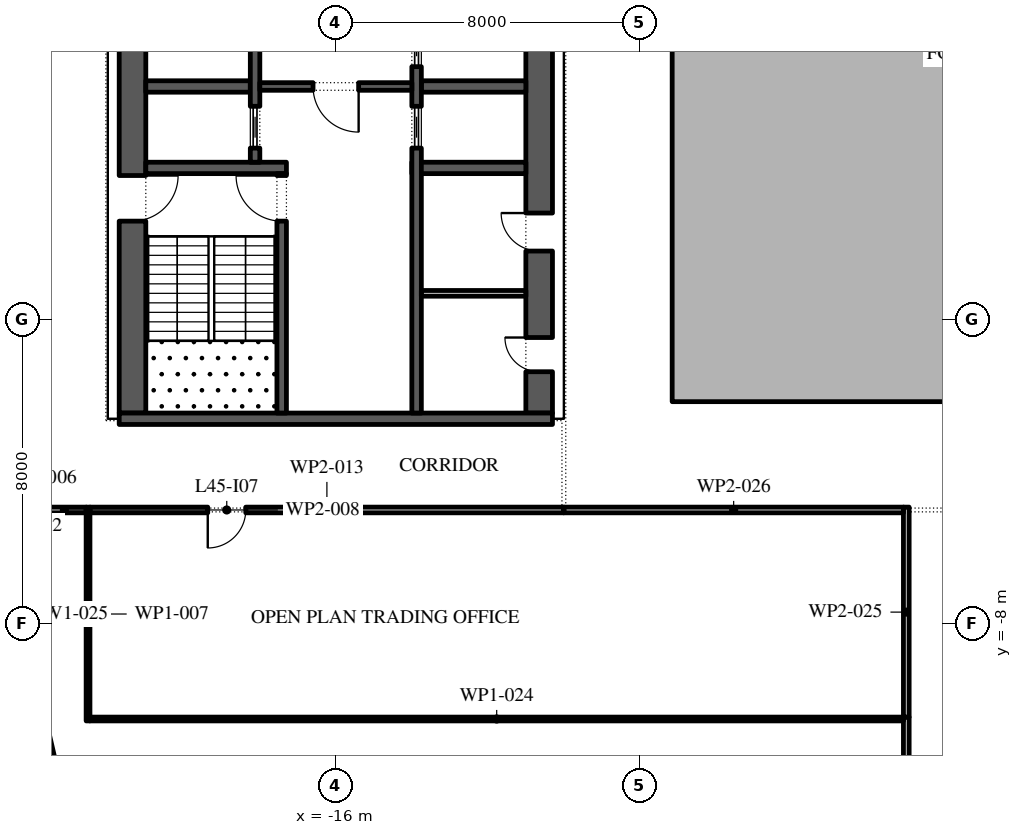
"""IFC4 building model, lengths in metres.
Left out: names, types, materials, properties, quantities, classifications, styles, units other than length and angle.
Written with IfcOpenShell. Run it as: python <this file> out.ifc"""

import sys

from ifc_helpers import new_model, si_unit, direction, frame, frame_2d, origin, place, context, subcontext, project, spatial, polyline, rectangle, outline, extrude, element, fill, save


model = new_model("IFC4")
c1 = context("Model", 3, precision=1e-05, world=origin(), true_north=direction((0.0, 1.0)))
c2 = subcontext(c1, "Body", "Model", "MODEL_VIEW")
j1 = project(units=[si_unit("LENGTHUNIT", "METRE"), si_unit("PLANEANGLEUNIT", "RADIAN")], contexts=[c1])
p1 = place(None, origin())
s1 = spatial("IfcSite", under=j1, at=p1, CompositionType="ELEMENT")
p2 = place(p1, origin())
s2 = spatial("IfcBuilding", under=s1, at=p2, CompositionType="ELEMENT")
p3 = place(p2, frame((0.0, 0.0, 205.2)))
s3 = spatial("IfcBuildingStorey", under=s2, at=p3, CompositionType="ELEMENT", Elevation=205.2)
p4 = place(p3, origin())
e1 = element("IfcWall", 1, at=p4, inside=s3, PredefinedType="STANDARD", context=c2, shape_type="SweptSolid", body=[
    extrude(outline(polyline([(-7.15, -2.15), (7.15, -2.15), (7.15, 16.15), (-7.15, 16.15), (-7.15, -2.15)]), holes=[polyline([(-7.0, -2.0), (-7.0, 16.0), (7.0, 16.0), (7.0, -2.0), (-7.0, -2.0)])]), origin(), (0.0, 0.0, 1.0), 4.0),
])
p5 = place(p3, frame((-17.592, -20.657, 0.0), z_axis=(0.0, 0.0, 1.0), x_axis=(0.974370243697, 0.224950279389, 0.0)))
e2 = element("IfcWall", 2, at=p5, inside=s3, PredefinedType="STANDARD", context=c2, shape_type="SweptSolid", body=[
    extrude(rectangle(XDim=49.5, YDim=0.3, at=frame_2d((24.75, 0.0))), origin(), (0.0, 0.0, 1.0), 4.0),
])
p6 = place(p5, frame((2.8, 0.0, 0.0)))
e3 = element("IfcOpeningElement", 3, at=p6, cuts=e2, PredefinedType="OPENING", context=c2, shape_type="SweptSolid", body=[
    extrude(rectangle(XDim=2.4, YDim=3.5, at=frame_2d((1.2, 1.75))), frame((0.0, 0.16, 0.0), z_axis=(0.0, -1.0, 0.0), x_axis=(1.0, 0.0, 0.0)), (0.0, 0.0, 1.0), 0.32),
])
p7 = place(p5, frame((9.9, 0.0, 0.45)))
e4 = element("IfcOpeningElement", 4, at=p7, cuts=e2, PredefinedType="OPENING", context=c2, shape_type="SweptSolid", body=[
    extrude(rectangle(XDim=4.5, YDim=2.575, at=frame_2d((2.25, 1.288))), frame((0.0, 0.16, 0.0), z_axis=(0.0, -1.0, 0.0), x_axis=(1.0, 0.0, 0.0)), (0.0, 0.0, 1.0), 0.32),
])
p8 = place(p5, frame((18.2, 0.0, 0.45)))
e5 = element("IfcOpeningElement", 5, at=p8, cuts=e2, PredefinedType="OPENING", context=c2, shape_type="SweptSolid", body=[
    extrude(rectangle(XDim=4.5, YDim=3.05, at=frame_2d((2.25, 1.525))), frame((0.0, 0.16, 0.0), z_axis=(0.0, -1.0, 0.0), x_axis=(1.0, 0.0, 0.0)), (0.0, 0.0, 1.0), 0.32),
])
p9 = place(p5, frame((26.5, 0.0, 0.45)))
e6 = element("IfcOpeningElement", 6, at=p9, cuts=e2, PredefinedType="OPENING", context=c2, shape_type="SweptSolid", body=[
    extrude(rectangle(XDim=4.5, YDim=2.75, at=frame_2d((2.25, 1.375))), frame((0.0, 0.16, 0.0), z_axis=(0.0, -1.0, 0.0), x_axis=(1.0, 0.0, 0.0)), (0.0, 0.0, 1.0), 0.32),
])
p10 = place(p5, frame((36.8, 0.0, 0.0)))
e7 = element("IfcOpeningElement", 7, at=p10, cuts=e2, PredefinedType="OPENING", context=c2, shape_type="SweptSolid", body=[
    extrude(rectangle(XDim=2.4, YDim=3.275, at=frame_2d((1.2, 1.637))), frame((0.0, 0.16, 0.0), z_axis=(0.0, -1.0, 0.0), x_axis=(1.0, 0.0, 0.0)), (0.0, 0.0, 1.0), 0.32),
])
p11 = place(p5, frame((43.1, 0.0, 0.45)))
e8 = element("IfcOpeningElement", 8, at=p11, cuts=e2, PredefinedType="OPENING", context=c2, shape_type="SweptSolid", body=[
    extrude(rectangle(XDim=4.5, YDim=2.875, at=frame_2d((2.25, 1.438))), frame((0.0, 0.16, 0.0), z_axis=(0.0, -1.0, 0.0), x_axis=(1.0, 0.0, 0.0)), (0.0, 0.0, 1.0), 0.32),
])
p12 = place(p3, frame((-33.157, 30.092, 0.0), z_axis=(0.0, 0.0, 1.0), x_axis=(0.224950279389, -0.974370243697, 0.0)))
e9 = element("IfcWall", 9, at=p12, inside=s3, PredefinedType="STANDARD", context=c2, shape_type="SweptSolid", body=[
    extrude(rectangle(XDim=49.5, YDim=0.3, at=frame_2d((24.75, 0.0))), origin(), (0.0, 0.0, 1.0), 4.0),
])
p13 = place(p12, frame((2.207, 0.0, 0.0)))
e10 = element("IfcOpeningElement", 10, at=p13, cuts=e9, PredefinedType="OPENING", context=c2, shape_type="SweptSolid", body=[
    extrude(rectangle(XDim=2.4, YDim=3.5, at=frame_2d((1.2, 1.75))), frame((0.0, 0.16, 0.0), z_axis=(0.0, -1.0, 0.0), x_axis=(1.0, 0.0, 0.0)), (0.0, 0.0, 1.0), 0.32),
])
p14 = place(p12, frame((8.121, 0.0, 0.45)))
e11 = element("IfcOpeningElement", 11, at=p14, cuts=e9, PredefinedType="OPENING", context=c2, shape_type="SweptSolid", body=[
    extrude(rectangle(XDim=4.5, YDim=2.825, at=frame_2d((2.25, 1.413))), frame((0.0, 0.16, 0.0), z_axis=(0.0, -1.0, 0.0), x_axis=(1.0, 0.0, 0.0)), (0.0, 0.0, 1.0), 0.32),
])
p15 = place(p12, frame((15.236, 0.0, 0.45)))
e12 = element("IfcOpeningElement", 12, at=p15, cuts=e9, PredefinedType="OPENING", context=c2, shape_type="SweptSolid", body=[
    extrude(rectangle(XDim=4.5, YDim=2.95, at=frame_2d((2.25, 1.475))), frame((0.0, 0.16, 0.0), z_axis=(0.0, -1.0, 0.0), x_axis=(1.0, 0.0, 0.0)), (0.0, 0.0, 1.0), 0.32),
])
p16 = place(p12, frame((22.35, 0.0, 0.45)))
e13 = element("IfcOpeningElement", 13, at=p16, cuts=e9, PredefinedType="OPENING", context=c2, shape_type="SweptSolid", body=[
    extrude(rectangle(XDim=4.5, YDim=3.0, at=frame_2d((2.25, 1.5))), frame((0.0, 0.16, 0.0), z_axis=(0.0, -1.0, 0.0), x_axis=(1.0, 0.0, 0.0)), (0.0, 0.0, 1.0), 0.32),
])
p17 = place(p12, frame((30.514, 0.0, 0.0)))
e14 = element("IfcOpeningElement", 14, at=p17, cuts=e9, PredefinedType="OPENING", context=c2, shape_type="SweptSolid", body=[
    extrude(rectangle(XDim=2.4, YDim=3.5, at=frame_2d((1.2, 1.75))), frame((0.0, 0.16, 0.0), z_axis=(0.0, -1.0, 0.0), x_axis=(1.0, 0.0, 0.0)), (0.0, 0.0, 1.0), 0.32),
])
p18 = place(p12, frame((36.579, 0.0, 0.45)))
e15 = element("IfcOpeningElement", 15, at=p18, cuts=e9, PredefinedType="OPENING", context=c2, shape_type="SweptSolid", body=[
    extrude(rectangle(XDim=4.5, YDim=3.05, at=frame_2d((2.25, 1.525))), frame((0.0, 0.16, 0.0), z_axis=(0.0, -1.0, 0.0), x_axis=(1.0, 0.0, 0.0)), (0.0, 0.0, 1.0), 0.32),
])
p19 = place(p12, frame((43.693, 0.0, 0.45)))
e16 = element("IfcOpeningElement", 16, at=p19, cuts=e9, PredefinedType="OPENING", context=c2, shape_type="SweptSolid", body=[
    extrude(rectangle(XDim=4.5, YDim=3.05, at=frame_2d((2.25, 1.525))), frame((0.0, 0.16, 0.0), z_axis=(0.0, -1.0, 0.0), x_axis=(1.0, 0.0, 0.0)), (0.0, 0.0, 1.0), 0.32),
])
p20 = place(p3, frame((-21.35, -2.45, 0.0), z_axis=(0.0, 0.0, 1.0), x_axis=(0.0, 1.0, 0.0)))
e17 = element("IfcWall", 17, at=p20, inside=s3, PredefinedType="SHEAR", context=c2, shape_type="SweptSolid", body=[
    extrude(rectangle(XDim=27.9, YDim=0.7, at=frame_2d((13.95, 0.0))), origin(), (0.0, 0.0, 1.0), 4.0),
])
p21 = place(p20, frame((5.05, 0.0, 0.0)))
e18 = element("IfcOpeningElement", 18, at=p21, cuts=e17, PredefinedType="OPENING", context=c2, shape_type="SweptSolid", body=[
    extrude(rectangle(XDim=1.2, YDim=2.1, at=frame_2d((0.6, 1.05))), frame((0.0, 0.36, 0.0), z_axis=(0.0, -1.0, 0.0), x_axis=(1.0, 0.0, 0.0)), (0.0, 0.0, 1.0), 0.72),
])
p22 = place(p20, frame((21.65, 0.0, 0.0)))
e19 = element("IfcOpeningElement", 19, at=p22, cuts=e17, PredefinedType="OPENING", context=c2, shape_type="SweptSolid", body=[
    extrude(rectangle(XDim=1.2, YDim=2.1, at=frame_2d((0.6, 1.05))), frame((0.0, 0.36, 0.0), z_axis=(0.0, -1.0, 0.0), x_axis=(1.0, 0.0, 0.0)), (0.0, 0.0, 1.0), 0.72),
])
p23 = place(p3, frame((-10.65, -2.45, 0.0), z_axis=(0.0, 0.0, 1.0), x_axis=(0.0, 1.0, 0.0)))
e20 = element("IfcWall", 20, at=p23, inside=s3, PredefinedType="SHEAR", context=c2, shape_type="SweptSolid", body=[
    extrude(rectangle(XDim=27.9, YDim=0.7, at=frame_2d((13.95, 0.0))), origin(), (0.0, 0.0, 1.0), 4.0),
])
p24 = place(p23, frame((23.65, 0.0, 0.0)))
e21 = element("IfcOpeningElement", 21, at=p24, cuts=e20, PredefinedType="OPENING", context=c2, shape_type="SweptSolid", body=[
    extrude(rectangle(XDim=2.4, YDim=2.1, at=frame_2d((1.2, 1.05))), frame((0.0, 0.36, 0.0), z_axis=(0.0, -1.0, 0.0), x_axis=(1.0, 0.0, 0.0)), (0.0, 0.0, 1.0), 0.72),
])
p25 = place(p23, frame((1.087, 0.0, 0.0)))
e22 = element("IfcOpeningElement", 22, at=p25, cuts=e20, PredefinedType="OPENING", context=c2, shape_type="SweptSolid", body=[
    extrude(rectangle(XDim=0.9, YDim=2.1, at=frame_2d((0.45, 1.05))), frame((0.0, 0.36, 0.0), z_axis=(0.0, -1.0, 0.0), x_axis=(1.0, 0.0, 0.0)), (0.0, 0.0, 1.0), 0.72),
])
p26 = place(p23, frame((4.262, 0.0, 0.0)))
e23 = element("IfcOpeningElement", 23, at=p26, cuts=e20, PredefinedType="OPENING", context=c2, shape_type="SweptSolid", body=[
    extrude(rectangle(XDim=1.0, YDim=2.1, at=frame_2d((0.5, 1.05))), frame((0.0, 0.36, 0.0), z_axis=(0.0, -1.0, 0.0), x_axis=(1.0, 0.0, 0.0)), (0.0, 0.0, 1.0), 0.72),
])
p27 = place(p3, frame((-21.7, -2.6, 0.0), z_axis=(0.0, 0.0, 1.0), x_axis=(1.0, 0.0, 0.0)))
e24 = element("IfcWall", 24, at=p27, inside=s3, PredefinedType="SHEAR", context=c2, shape_type="SweptSolid", body=[
    extrude(rectangle(XDim=11.4, YDim=0.3, at=frame_2d((5.7, 0.0))), origin(), (0.0, 0.0, 1.0), 4.0),
])
p28 = place(p3, frame((-21.0, 4.0, 0.0), z_axis=(0.0, 0.0, 1.0), x_axis=(1.0, 0.0, 0.0)))
e25 = element("IfcWall", 25, at=p28, inside=s3, PredefinedType="SHEAR", context=c2, shape_type="SweptSolid", body=[
    extrude(rectangle(XDim=3.7, YDim=0.3, at=frame_2d((1.85, 0.0))), origin(), (0.0, 0.0, 1.0), 4.0),
])
p29 = place(p3, frame((-17.425, -2.45, 0.0), z_axis=(0.0, 0.0, 1.0), x_axis=(0.0, 1.0, 0.0)))
e26 = element("IfcWall", 26, at=p29, inside=s3, PredefinedType="SHEAR", context=c2, shape_type="SweptSolid", body=[
    extrude(rectangle(XDim=6.3, YDim=0.25, at=frame_2d((3.15, 0.0))), origin(), (0.0, 0.0, 1.0), 4.0),
])
p30 = place(p29, frame((5.05, 0.0, 0.0)))
e27 = element("IfcOpeningElement", 27, at=p30, cuts=e26, PredefinedType="OPENING", context=c2, shape_type="SweptSolid", body=[
    extrude(rectangle(XDim=1.2, YDim=2.1, at=frame_2d((0.6, 1.05))), frame((0.0, 0.135, 0.0), z_axis=(0.0, -1.0, 0.0), x_axis=(1.0, 0.0, 0.0)), (0.0, 0.0, 1.0), 0.27),
])
p31 = place(p3, frame((-21.0, 6.143, 0.0), z_axis=(0.0, 0.0, 1.0), x_axis=(1.0, 0.0, 0.0)))
e28 = element("IfcWall", 28, at=p31, inside=s3, PredefinedType="SHEAR", context=c2, shape_type="SweptSolid", body=[
    extrude(rectangle(XDim=2.75, YDim=0.3, at=frame_2d((1.375, 0.0))), origin(), (0.0, 0.0, 1.0), 4.0),
])
p32 = place(p3, frame((-18.125, 4.15, 0.0), z_axis=(0.0, 0.0, 1.0), x_axis=(0.0, 1.0, 0.0)))
e29 = element("IfcWall", 29, at=p32, inside=s3, PredefinedType="SHEAR", context=c2, shape_type="SweptSolid", body=[
    extrude(rectangle(XDim=14.7, YDim=0.25, at=frame_2d((7.35, 0.0))), origin(), (0.0, 0.0, 1.0), 4.0),
])
p33 = place(p32, frame((6.9, 0.0, 0.0)))
e30 = element("IfcOpeningElement", 30, at=p33, cuts=e29, PredefinedType="OPENING", context=c2, shape_type="SweptSolid", body=[
    extrude(rectangle(XDim=0.9, YDim=2.1, at=frame_2d((0.45, 1.05))), frame((0.0, 0.135, 0.0), z_axis=(0.0, -1.0, 0.0), x_axis=(1.0, 0.0, 0.0)), (0.0, 0.0, 1.0), 0.27),
])
p34 = place(p32, frame((0.371, 0.0, 0.0)))
e31 = element("IfcOpeningElement", 31, at=p34, cuts=e29, PredefinedType="OPENING", context=c2, shape_type="SweptSolid", body=[
    extrude(rectangle(XDim=1.1, YDim=2.1, at=frame_2d((0.55, 1.05))), frame((0.0, 0.135, 0.0), z_axis=(0.0, -1.0, 0.0), x_axis=(1.0, 0.0, 0.0)), (0.0, 0.0, 1.0), 0.27),
])
p35 = place(p32, frame((13.229, 0.0, 0.0)))
e32 = element("IfcOpeningElement", 32, at=p35, cuts=e29, PredefinedType="OPENING", context=c2, shape_type="SweptSolid", body=[
    extrude(rectangle(XDim=1.1, YDim=2.1, at=frame_2d((0.55, 1.05))), frame((0.0, 0.135, 0.0), z_axis=(0.0, -1.0, 0.0), x_axis=(1.0, 0.0, 0.0)), (0.0, 0.0, 1.0), 0.27),
])
p36 = place(p3, frame((-14.0, 4.0, 0.0), z_axis=(0.0, 0.0, 1.0), x_axis=(1.0, 0.0, 0.0)))
e33 = element("IfcWall", 33, at=p36, inside=s3, PredefinedType="SHEAR", context=c2, shape_type="SweptSolid", body=[
    extrude(rectangle(XDim=3.0, YDim=0.3, at=frame_2d((1.5, 0.0))), origin(), (0.0, 0.0, 1.0), 4.0),
])
p37 = place(p3, frame((-13.75, 6.143, 0.0), z_axis=(0.0, 0.0, 1.0), x_axis=(1.0, 0.0, 0.0)))
e34 = element("IfcWall", 34, at=p37, inside=s3, PredefinedType="SHEAR", context=c2, shape_type="SweptSolid", body=[
    extrude(rectangle(XDim=2.75, YDim=0.3, at=frame_2d((1.375, 0.0))), origin(), (0.0, 0.0, 1.0), 4.0),
])
p38 = place(p3, frame((-13.875, -2.45, 0.0), z_axis=(0.0, 0.0, 1.0), x_axis=(0.0, 1.0, 0.0)))
e35 = element("IfcWall", 35, at=p38, inside=s3, PredefinedType="SHEAR", context=c2, shape_type="SweptSolid", body=[
    extrude(rectangle(XDim=21.3, YDim=0.25, at=frame_2d((10.65, 0.0))), origin(), (0.0, 0.0, 1.0), 4.0),
])
p39 = place(p38, frame((17.786, 0.0, 0.0)))
e36 = element("IfcOpeningElement", 36, at=p39, cuts=e35, PredefinedType="OPENING", context=c2, shape_type="SweptSolid", body=[
    extrude(rectangle(XDim=0.9, YDim=2.1, at=frame_2d((0.45, 1.05))), frame((0.0, 0.135, 0.0), z_axis=(0.0, -1.0, 0.0), x_axis=(1.0, 0.0, 0.0)), (0.0, 0.0, 1.0), 0.27),
])
p40 = place(p38, frame((6.971, 0.0, 0.0)))
e37 = element("IfcOpeningElement", 37, at=p40, cuts=e35, PredefinedType="OPENING", context=c2, shape_type="SweptSolid", body=[
    extrude(rectangle(XDim=1.1, YDim=2.1, at=frame_2d((0.55, 1.05))), frame((0.0, 0.135, 0.0), z_axis=(0.0, -1.0, 0.0), x_axis=(1.0, 0.0, 0.0)), (0.0, 0.0, 1.0), 0.27),
])
p41 = place(p38, frame((9.114, 0.0, 0.0)))
e38 = element("IfcOpeningElement", 38, at=p41, cuts=e35, PredefinedType="OPENING", context=c2, shape_type="SweptSolid", body=[
    extrude(rectangle(XDim=1.1, YDim=2.1, at=frame_2d((0.55, 1.05))), frame((0.0, 0.135, 0.0), z_axis=(0.0, -1.0, 0.0), x_axis=(1.0, 0.0, 0.0)), (0.0, 0.0, 1.0), 0.27),
])
p42 = place(p38, frame((11.257, 0.0, 0.0)))
e39 = element("IfcOpeningElement", 39, at=p42, cuts=e35, PredefinedType="OPENING", context=c2, shape_type="SweptSolid", body=[
    extrude(rectangle(XDim=1.1, YDim=2.1, at=frame_2d((0.55, 1.05))), frame((0.0, 0.135, 0.0), z_axis=(0.0, -1.0, 0.0), x_axis=(1.0, 0.0, 0.0)), (0.0, 0.0, 1.0), 0.27),
])
p43 = place(p38, frame((13.4, 0.0, 0.0)))
e40 = element("IfcOpeningElement", 40, at=p43, cuts=e35, PredefinedType="OPENING", context=c2, shape_type="SweptSolid", body=[
    extrude(rectangle(XDim=1.1, YDim=2.1, at=frame_2d((0.55, 1.05))), frame((0.0, 0.135, 0.0), z_axis=(0.0, -1.0, 0.0), x_axis=(1.0, 0.0, 0.0)), (0.0, 0.0, 1.0), 0.27),
])
p44 = place(p3, frame((-18.0, 6.143, 0.0), z_axis=(0.0, 0.0, 1.0), x_axis=(1.0, 0.0, 0.0)))
e41 = element("IfcWall", 41, at=p44, inside=s3, PredefinedType="SHEAR", context=c2, shape_type="SweptSolid", body=[
    extrude(rectangle(XDim=4.0, YDim=0.2, at=frame_2d((2.0, 0.0))), origin(), (0.0, 0.0, 1.0), 4.0),
])
p45 = place(p44, frame((1.4, 0.0, 0.0)))
e42 = element("IfcOpeningElement", 42, at=p45, cuts=e41, PredefinedType="OPENING", context=c2, shape_type="SweptSolid", body=[
    extrude(rectangle(XDim=1.2, YDim=2.1, at=frame_2d((0.6, 1.05))), frame((0.0, 0.11, 0.0), z_axis=(0.0, -1.0, 0.0), x_axis=(1.0, 0.0, 0.0)), (0.0, 0.0, 1.0), 0.22),
])
p46 = place(p3, frame((-13.75, 0.7, 0.0), z_axis=(0.0, 0.0, 1.0), x_axis=(1.0, 0.0, 0.0)))
e43 = element("IfcWall", 43, at=p46, inside=s3, PredefinedType="PARTITIONING", context=c2, shape_type="SweptSolid", body=[
    extrude(rectangle(XDim=2.75, YDim=0.15, at=frame_2d((1.375, 0.0))), origin(), (0.0, 0.0, 1.0), 4.0),
])
p47 = place(p3, frame((-22.52, -10.55, 0.0), z_axis=(0.0, 0.0, 1.0), x_axis=(0.0, 1.0, 0.0)))
e44 = element("IfcWall", 44, at=p47, inside=s3, PredefinedType="PARTITIONING", context=c2, shape_type="SweptSolid", body=[
    extrude(rectangle(XDim=5.625, YDim=0.1, at=frame_2d((2.812, 0.0))), origin(), (0.0, 0.0, 1.0), 4.0),
])
p48 = place(p3, frame((-22.57, -5.0, 0.0), z_axis=(0.0, 0.0, 1.0), x_axis=(-1.0, 0.0, 0.0)))
e45 = element("IfcWall", 45, at=p48, inside=s3, PredefinedType="PARTITIONING", context=c2, shape_type="SweptSolid", body=[
    extrude(rectangle(XDim=1.145, YDim=0.15, at=frame_2d((0.573, 0.0))), origin(), (0.0, 0.0, 1.0), 4.0),
])
p49 = place(p3, frame((-10.0, -5.0, 0.0), z_axis=(0.0, 0.0, 1.0), x_axis=(-1.0, 0.0, 0.0)))
e46 = element("IfcWall", 46, at=p49, inside=s3, PredefinedType="PARTITIONING", context=c2, shape_type="SweptSolid", body=[
    extrude(rectangle(XDim=12.47, YDim=0.15, at=frame_2d((6.235, 0.0))), origin(), (0.0, 0.0, 1.0), 4.0),
])
p50 = place(p49, frame((8.37, 0.0, 0.0)))
e47 = element("IfcOpeningElement", 47, at=p50, cuts=e46, PredefinedType="OPENING", context=c2, shape_type="SweptSolid", body=[
    extrude(rectangle(XDim=1.0, YDim=2.1, at=frame_2d((0.5, 1.05))), frame((0.0, 0.085, 0.0), z_axis=(0.0, -1.0, 0.0), x_axis=(1.0, 0.0, 0.0)), (0.0, 0.0, 1.0), 0.17),
])
p51 = place(p3, frame((-0.99, -16.753, 0.0), z_axis=(0.0, 0.0, 1.0), x_axis=(0.0, 1.0, 0.0)))
e48 = element("IfcWall", 48, at=p51, inside=s3, PredefinedType="PARTITIONING", context=c2, shape_type="SweptSolid", body=[
    extrude(rectangle(XDim=6.303, YDim=0.15, at=frame_2d((3.151, 0.0))), origin(), (0.0, 0.0, 1.0), 4.0),
])
p52 = place(p51, frame((1.103, 0.0, 0.0)))
e49 = element("IfcOpeningElement", 49, at=p52, cuts=e48, PredefinedType="OPENING", context=c2, shape_type="SweptSolid", body=[
    extrude(rectangle(XDim=1.0, YDim=2.1, at=frame_2d((0.5, 1.05))), frame((0.0, 0.085, 0.0), z_axis=(0.0, -1.0, 0.0), x_axis=(1.0, 0.0, 0.0)), (0.0, 0.0, 1.0), 0.17),
])
p53 = place(p3, frame((-1.065, -10.5, 0.0), z_axis=(0.0, 0.0, 1.0), x_axis=(-1.0, 0.0, 0.0)))
e50 = element("IfcWall", 50, at=p53, inside=s3, PredefinedType="PARTITIONING", context=c2, shape_type="SweptSolid", body=[
    extrude(rectangle(XDim=21.405, YDim=0.1, at=frame_2d((10.703, 0.0))), origin(), (0.0, 0.0, 1.0), 4.0),
])
p54 = place(p3, frame((-0.99, -10.45, 0.0), z_axis=(0.0, 0.0, 1.0), x_axis=(0.0, 1.0, 0.0)))
e51 = element("IfcWall", 51, at=p54, inside=s3, PredefinedType="PARTITIONING", context=c2, shape_type="SweptSolid", body=[
    extrude(rectangle(XDim=5.525, YDim=0.15, at=frame_2d((2.762, 0.0))), origin(), (0.0, 0.0, 1.0), 4.0),
])
p55 = place(p3, frame((-1.065, -5.0, 0.0), z_axis=(0.0, 0.0, 1.0), x_axis=(-1.0, 0.0, 0.0)))
e52 = element("IfcWall", 52, at=p55, inside=s3, PredefinedType="PARTITIONING", context=c2, shape_type="SweptSolid", body=[
    extrude(rectangle(XDim=8.935, YDim=0.15, at=frame_2d((4.468, 0.0))), origin(), (0.0, 0.0, 1.0), 4.0),
])
p56 = place(p34, origin())
e53 = element("IfcDoor", 53, at=p56, inside=s3, OperationType="SLIDING_TO_LEFT", PredefinedType="DOOR", context=c2, shape_type="SweptSolid", body=[
    extrude(rectangle(XDim=1.1, YDim=2.1, at=frame_2d((0.55, 1.05))), frame((0.0, 0.025, 0.0), z_axis=(0.0, -1.0, 0.0), x_axis=(1.0, 0.0, 0.0)), (0.0, 0.0, 1.0), 0.05),
])
fill(e31, e53)
p57 = place(p40, origin())
e54 = element("IfcDoor", 54, at=p57, inside=s3, OperationType="SLIDING_TO_LEFT", PredefinedType="DOOR", context=c2, shape_type="SweptSolid", body=[
    extrude(rectangle(XDim=1.1, YDim=2.1, at=frame_2d((0.55, 1.05))), frame((0.0, 0.025, 0.0), z_axis=(0.0, -1.0, 0.0), x_axis=(1.0, 0.0, 0.0)), (0.0, 0.0, 1.0), 0.05),
])
fill(e37, e54)
p58 = place(p41, origin())
e55 = element("IfcDoor", 55, at=p58, inside=s3, OperationType="SLIDING_TO_LEFT", PredefinedType="DOOR", context=c2, shape_type="SweptSolid", body=[
    extrude(rectangle(XDim=1.1, YDim=2.1, at=frame_2d((0.55, 1.05))), frame((0.0, 0.025, 0.0), z_axis=(0.0, -1.0, 0.0), x_axis=(1.0, 0.0, 0.0)), (0.0, 0.0, 1.0), 0.05),
])
fill(e38, e55)
p59 = place(p45, frame((1.2, 0.0, 0.0), z_axis=(0.0, 0.0, 1.0), x_axis=(-1.0, 0.0, 0.0)))
e56 = element("IfcDoor", 56, at=p59, inside=s3, OperationType="SINGLE_SWING_RIGHT", PredefinedType="DOOR", context=c2, shape_type="SweptSolid", body=[
    extrude(rectangle(XDim=1.2, YDim=2.1, at=frame_2d((0.6, 1.05))), frame((0.0, 0.025, 0.0), z_axis=(0.0, -1.0, 0.0), x_axis=(1.0, 0.0, 0.0)), (0.0, 0.0, 1.0), 0.05),
])
fill(e42, e56)
p60 = place(p30, origin())
e57 = element("IfcDoor", 57, at=p60, inside=s3, OperationType="SINGLE_SWING_LEFT", PredefinedType="DOOR", context=c2, shape_type="SweptSolid", body=[
    extrude(rectangle(XDim=1.2, YDim=2.1, at=frame_2d((0.6, 1.05))), frame((0.0, 0.025, 0.0), z_axis=(0.0, -1.0, 0.0), x_axis=(1.0, 0.0, 0.0)), (0.0, 0.0, 1.0), 0.05),
])
fill(e27, e57)
p61 = place(p21, frame((1.2, 0.0, 0.0), z_axis=(0.0, 0.0, 1.0), x_axis=(-1.0, 0.0, 0.0)))
e58 = element("IfcDoor", 58, at=p61, inside=s3, OperationType="SINGLE_SWING_RIGHT", PredefinedType="DOOR", context=c2, shape_type="SweptSolid", body=[
    extrude(rectangle(XDim=1.2, YDim=2.1, at=frame_2d((0.6, 1.05))), frame((0.0, 0.025, 0.0), z_axis=(0.0, -1.0, 0.0), x_axis=(1.0, 0.0, 0.0)), (0.0, 0.0, 1.0), 0.05),
])
fill(e18, e58)
p62 = place(p25, origin())
e59 = element("IfcDoor", 59, at=p62, inside=s3, OperationType="SINGLE_SWING_LEFT", PredefinedType="DOOR", context=c2, shape_type="SweptSolid", body=[
    extrude(rectangle(XDim=0.9, YDim=2.1, at=frame_2d((0.45, 1.05))), frame((0.0, 0.35, 0.0), z_axis=(0.0, -1.0, 0.0), x_axis=(1.0, 0.0, 0.0)), (0.0, 0.0, 1.0), 0.05),
])
fill(e22, e59)
p63 = place(p26, origin())
e60 = element("IfcDoor", 60, at=p63, inside=s3, OperationType="SINGLE_SWING_LEFT", PredefinedType="DOOR", context=c2, shape_type="SweptSolid", body=[
    extrude(rectangle(XDim=1.0, YDim=2.1, at=frame_2d((0.5, 1.05))), frame((0.0, 0.35, 0.0), z_axis=(0.0, -1.0, 0.0), x_axis=(1.0, 0.0, 0.0)), (0.0, 0.0, 1.0), 0.05),
])
fill(e23, e60)
p64 = place(p50, origin())
e61 = element("IfcDoor", 61, at=p64, inside=s3, OperationType="SINGLE_SWING_LEFT", PredefinedType="DOOR", context=c2, shape_type="SweptSolid", body=[
    extrude(rectangle(XDim=1.0, YDim=2.1, at=frame_2d((0.5, 1.05))), frame((0.0, 0.025, 0.0), z_axis=(0.0, -1.0, 0.0), x_axis=(1.0, 0.0, 0.0)), (0.0, 0.0, 1.0), 0.05),
])
fill(e47, e61)
save(model, sys.argv[1])
